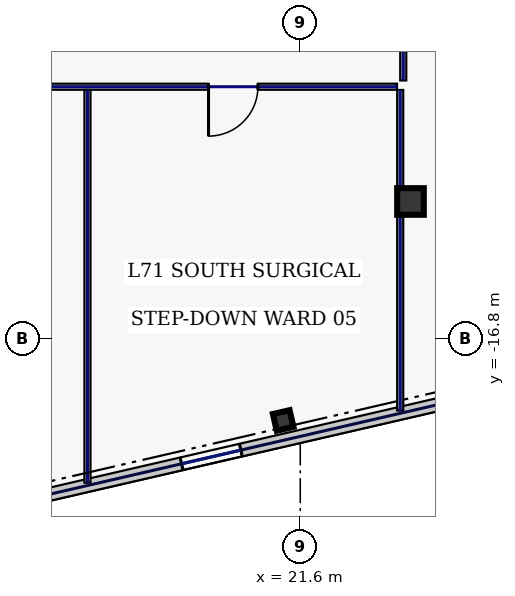
"""IFC4 building model, lengths in metres.
Left out: names, types, materials, properties, quantities, classifications, styles, units other than length and angle.
Written with IfcOpenShell. Run it as: python <this file> out.ifc"""

import sys

from ifc_helpers import new_model, si_unit, direction, frame, frame_2d, origin, origin_2d, place, context, subcontext, project, spatial, rectangle, hollow_rectangle, extrude, element, fill, save


model = new_model("IFC4")
c1 = context("Model", 3, precision=1e-05, world=origin(), true_north=direction((0.0, 1.0)))
c2 = subcontext(c1, "Body", "Model", "MODEL_VIEW")
j1 = project(units=[si_unit("LENGTHUNIT", "METRE"), si_unit("PLANEANGLEUNIT", "RADIAN")], contexts=[c1])
p1 = place(None, origin())
s1 = spatial("IfcSite", under=j1, at=p1, CompositionType="ELEMENT")
p2 = place(p1, origin())
s2 = spatial("IfcBuilding", under=s1, at=p2, CompositionType="ELEMENT")
p3 = place(p2, frame((0.0, 0.0, 305.0)))
s3 = spatial("IfcBuildingStorey", under=s2, at=p3, CompositionType="ELEMENT", Elevation=305.0)
p4 = place(p3, frame((24.5, -13.2, 0.0), z_axis=(0.0, 0.0, 1.0), x_axis=(1.0, 0.0, 0.0)))
e1 = element("IfcColumn", 1, at=p4, inside=s3, PredefinedType="COLUMN", context=c2, shape_type="SweptSolid", body=[
    extrude(hollow_rectangle(XDim=0.7, YDim=0.7, WallThickness=0.032, at=origin_2d()), origin(), (0.0, 0.0, 1.0), 3.74),
])
p5 = place(p3, frame((21.15, -18.962, 0.0), z_axis=(0.0, 0.0, 1.0), x_axis=(0.974370064785, 0.224951054344, 0.0)))
e2 = element("IfcColumn", 2, at=p5, inside=s3, PredefinedType="COLUMN", context=c2, shape_type="SweptSolid", body=[
    extrude(hollow_rectangle(XDim=0.45, YDim=0.45, WallThickness=0.022, at=origin_2d()), origin(), (0.0, 0.0, 1.0), 3.74),
])
p6 = place(p3, frame((12.445, -21.495, 0.0), z_axis=(0.0, 0.0, 1.0), x_axis=(0.974369392164, 0.224953967767, 0.0)))
e3 = element("IfcWall", 3, at=p6, inside=s3, PredefinedType="STANDARD", context=c2, shape_type="SweptSolid", body=[
    extrude(rectangle(XDim=17.366, YDim=0.34, at=frame_2d((8.683, 0.0))), origin(), (0.0, 0.0, 1.0), 3.74),
])
p7 = place(p6, frame((6.19, 0.0, 0.22)))
e4 = element("IfcOpeningElement", 4, at=p7, cuts=e3, PredefinedType="OPENING", context=c2, shape_type="SweptSolid", body=[
    extrude(rectangle(XDim=1.6, YDim=1.2, at=frame_2d((0.8, 0.6))), frame((0.0, 0.18, 0.0), z_axis=(0.0, -1.0, 0.0), x_axis=(1.0, 0.0, 0.0)), (0.0, 0.0, 1.0), 0.36),
])
p8 = place(p6, frame((13.825, 0.0, 0.22)))
e5 = element("IfcOpeningElement", 5, at=p8, cuts=e3, PredefinedType="OPENING", context=c2, shape_type="SweptSolid", body=[
    extrude(rectangle(XDim=1.6, YDim=1.2, at=frame_2d((0.8, 0.6))), frame((0.0, 0.18, 0.0), z_axis=(0.0, -1.0, 0.0), x_axis=(1.0, 0.0, 0.0)), (0.0, 0.0, 1.0), 0.36),
])
p9 = place(p3, frame((32.686, -12.276, 0.0), z_axis=(0.0, 0.0, 1.0), x_axis=(-0.224953091034, 0.974369594576, 0.0)))
e6 = element("IfcWall", 6, at=p9, inside=s3, PredefinedType="STANDARD", context=c2, shape_type="SweptSolid", body=[
    extrude(rectangle(XDim=36.2, YDim=0.34, at=frame_2d((18.1, 0.0))), origin(), (0.0, 0.0, 1.0), 3.74),
])
p10 = place(p9, frame((3.725, 0.0, 0.22)))
e7 = element("IfcOpeningElement", 7, at=p10, cuts=e6, PredefinedType="OPENING", context=c2, shape_type="SweptSolid", body=[
    extrude(rectangle(XDim=1.6, YDim=1.2, at=frame_2d((0.8, 0.6))), frame((0.0, 0.18, 0.0), z_axis=(0.0, -1.0, 0.0), x_axis=(1.0, 0.0, 0.0)), (0.0, 0.0, 1.0), 0.36),
])
p11 = place(p9, frame((21.825, 0.0, 0.22)))
e8 = element("IfcOpeningElement", 8, at=p11, cuts=e6, PredefinedType="OPENING", context=c2, shape_type="SweptSolid", body=[
    extrude(rectangle(XDim=1.6, YDim=1.2, at=frame_2d((0.8, 0.6))), frame((0.0, 0.18, 0.0), z_axis=(0.0, -1.0, 0.0), x_axis=(1.0, 0.0, 0.0)), (0.0, 0.0, 1.0), 0.36),
])
p12 = place(p9, frame((30.875, 0.0, 0.22)))
e9 = element("IfcOpeningElement", 9, at=p12, cuts=e6, PredefinedType="OPENING", context=c2, shape_type="SweptSolid", body=[
    extrude(rectangle(XDim=1.6, YDim=1.2, at=frame_2d((0.8, 0.6))), frame((0.0, 0.18, 0.0), z_axis=(0.0, -1.0, 0.0), x_axis=(1.0, 0.0, 0.0)), (0.0, 0.0, 1.0), 0.36),
])
p13 = place(p3, frame((24.31, 10.115, 0.0), z_axis=(0.0, 0.0, 1.0), x_axis=(0.0, -1.0, 0.0)))
e10 = element("IfcWall", 10, at=p13, inside=s3, PredefinedType="PARTITIONING", context=c2, shape_type="SweptSolid", body=[
    extrude(rectangle(XDim=20.13, YDim=0.16, at=frame_2d((10.065, 0.0))), origin(), (0.0, 0.0, 1.0), 3.74),
])
p14 = place(p13, frame((14.581, 0.0, 0.0)))
e11 = element("IfcOpeningElement", 11, at=p14, cuts=e10, PredefinedType="OPENING", context=c2, shape_type="SweptSolid", body=[
    extrude(rectangle(XDim=0.95, YDim=2.2, at=frame_2d((0.475, 1.1))), frame((0.0, 0.09, 0.0), z_axis=(0.0, -1.0, 0.0), x_axis=(1.0, 0.0, 0.0)), (0.0, 0.0, 1.0), 0.18),
])
p15 = place(p13, frame((4.819, 0.0, 0.0)))
e12 = element("IfcOpeningElement", 12, at=p15, cuts=e10, PredefinedType="OPENING", context=c2, shape_type="SweptSolid", body=[
    extrude(rectangle(XDim=0.95, YDim=2.2, at=frame_2d((0.475, 1.1))), frame((0.0, 0.09, 0.0), z_axis=(0.0, -1.0, 0.0), x_axis=(1.0, 0.0, 0.0)), (0.0, 0.0, 1.0), 0.18),
])
p16 = place(p3, frame((24.145, -10.18, 0.0), z_axis=(0.0, 0.0, 1.0), x_axis=(-1.0, 0.0, 0.0)))
e13 = element("IfcWall", 13, at=p16, inside=s3, PredefinedType="PARTITIONING", context=c2, shape_type="SweptSolid", body=[
    extrude(rectangle(XDim=36.68, YDim=0.16, at=frame_2d((18.34, 0.0))), origin(), (0.0, 0.0, 1.0), 3.74),
])
p17 = place(p16, frame((32.771, 0.0, 0.0)))
e14 = element("IfcOpeningElement", 14, at=p17, cuts=e13, PredefinedType="OPENING", context=c2, shape_type="SweptSolid", body=[
    extrude(rectangle(XDim=1.15, YDim=2.2, at=frame_2d((0.575, 1.1))), frame((0.0, 0.09, 0.0), z_axis=(0.0, -1.0, 0.0), x_axis=(1.0, 0.0, 0.0)), (0.0, 0.0, 1.0), 0.18),
])
p18 = place(p16, frame((26.48, 0.0, 0.0)))
e15 = element("IfcOpeningElement", 15, at=p18, cuts=e13, PredefinedType="OPENING", context=c2, shape_type="SweptSolid", body=[
    extrude(rectangle(XDim=0.95, YDim=2.2, at=frame_2d((0.475, 1.1))), frame((0.0, 0.09, 0.0), z_axis=(0.0, -1.0, 0.0), x_axis=(1.0, 0.0, 0.0)), (0.0, 0.0, 1.0), 0.18),
])
p19 = place(p16, frame((20.78, 0.0, 0.0)))
e16 = element("IfcOpeningElement", 16, at=p19, cuts=e13, PredefinedType="OPENING", context=c2, shape_type="SweptSolid", body=[
    extrude(rectangle(XDim=0.95, YDim=2.2, at=frame_2d((0.475, 1.1))), frame((0.0, 0.09, 0.0), z_axis=(0.0, -1.0, 0.0), x_axis=(1.0, 0.0, 0.0)), (0.0, 0.0, 1.0), 0.18),
])
p20 = place(p16, frame((12.78, 0.0, 0.0)))
e17 = element("IfcOpeningElement", 17, at=p20, cuts=e13, PredefinedType="OPENING", context=c2, shape_type="SweptSolid", body=[
    extrude(rectangle(XDim=1.3, YDim=2.2, at=frame_2d((0.65, 1.1))), frame((0.0, 0.09, 0.0), z_axis=(0.0, -1.0, 0.0), x_axis=(1.0, 0.0, 0.0)), (0.0, 0.0, 1.0), 0.18),
])
p21 = place(p16, frame((3.659, 0.0, 0.0)))
e18 = element("IfcOpeningElement", 18, at=p21, cuts=e13, PredefinedType="OPENING", context=c2, shape_type="SweptSolid", body=[
    extrude(rectangle(XDim=1.3, YDim=2.2, at=frame_2d((0.65, 1.1))), frame((0.0, 0.09, 0.0), z_axis=(0.0, -1.0, 0.0), x_axis=(1.0, 0.0, 0.0)), (0.0, 0.0, 1.0), 0.18),
])
p22 = place(p3, frame((24.23, -18.703, 0.0), z_axis=(0.0, 0.0, 1.0), x_axis=(0.0, 1.0, 0.0)))
e19 = element("IfcWall", 19, at=p22, inside=s3, PredefinedType="PARTITIONING", context=c2, shape_type="SweptSolid", body=[
    extrude(rectangle(XDim=8.438, YDim=0.16, at=frame_2d((4.219, 0.0))), origin(), (0.0, 0.0, 1.0), 3.74),
])
p23 = place(p3, frame((16.0, -20.603, 0.0), z_axis=(0.0, 0.0, 1.0), x_axis=(0.0, 1.0, 0.0)))
e20 = element("IfcWall", 20, at=p23, inside=s3, PredefinedType="PARTITIONING", context=c2, shape_type="SweptSolid", body=[
    extrude(rectangle(XDim=10.338, YDim=0.16, at=frame_2d((5.169, 0.0))), origin(), (0.0, 0.0, 1.0), 3.74),
])
p24 = place(p7, origin())
e21 = element("IfcWindow", 21, at=p24, inside=s3, PartitioningType="SINGLE_PANEL", PredefinedType="WINDOW", context=c2, shape_type="SweptSolid", body=[
    extrude(rectangle(XDim=1.6, YDim=1.2, at=frame_2d((0.8, 0.6))), frame((0.0, 0.03, 0.0), z_axis=(0.0, -1.0, 0.0), x_axis=(1.0, 0.0, 0.0)), (0.0, 0.0, 1.0), 0.06),
])
fill(e4, e21)
p25 = place(p21, origin())
e22 = element("IfcDoor", 22, at=p25, inside=s3, OperationType="SINGLE_SWING_RIGHT", PredefinedType="DOOR", context=c2, shape_type="SweptSolid", body=[
    extrude(rectangle(XDim=1.3, YDim=2.2, at=frame_2d((0.65, 1.1))), frame((0.0, 0.025, 0.0), z_axis=(0.0, -1.0, 0.0), x_axis=(1.0, 0.0, 0.0)), (0.0, 0.0, 1.0), 0.05),
])
fill(e18, e22)
save(model, sys.argv[1])
